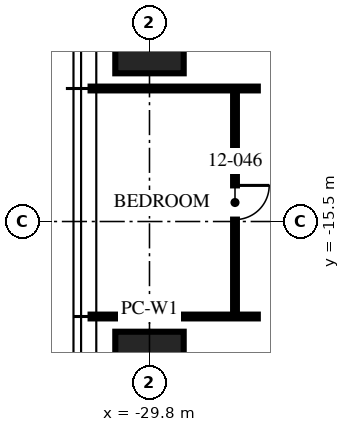
"""IFC4 building model, lengths in metres.
Left out: names, types, materials, properties, quantities, classifications, styles, units other than length and angle.
Written with IfcOpenShell. Run it as: python <this file> out.ifc"""

import sys

from ifc_helpers import new_model, si_unit, direction, frame, frame_2d, origin, origin_2d, place, context, subcontext, project, spatial, rectangle, hollow_rectangle, extrude, element, fill, save


model = new_model("IFC4")
c1 = context("Model", 3, precision=1e-05, world=origin(), true_north=direction((0.0, 1.0)))
c2 = subcontext(c1, "Body", "Model", "MODEL_VIEW")
j1 = project(units=[si_unit("LENGTHUNIT", "METRE"), si_unit("PLANEANGLEUNIT", "RADIAN")], contexts=[c1])
p1 = place(None, origin())
s1 = spatial("IfcSite", under=j1, at=p1, CompositionType="ELEMENT")
p2 = place(p1, origin())
s2 = spatial("IfcBuilding", under=s1, at=p2, CompositionType="ELEMENT")
p3 = place(p2, frame((0.0, 0.0, 51.0)))
s3 = spatial("IfcBuildingStorey", under=s2, at=p3, CompositionType="ELEMENT", Elevation=51.0)
for number, where, z_axis, x_axis in (
    (1, (-29.8, -20.0, 0.0), (0.0, 0.0, 1.0), (0.0, 1.0, 0.0)),
    (2, (-29.8, -10.0, 0.0), (0.0, 0.0, 1.0), (0.0, 1.0, 0.0)),
):
    element("IfcColumn", number, at=place(p3, frame(where, z_axis=z_axis, x_axis=x_axis)), inside=s3, PredefinedType="COLUMN", context=c2, shape_type="SweptSolid", body=[
        extrude(hollow_rectangle(XDim=3.2, YDim=1.8, WallThickness=0.2, at=origin_2d()), origin(), (0.0, 0.0, 1.0), 3.75),
    ])
for number, where, z_axis, x_axis in (
    (3, (-26.95, -12.0, 0.0), (0.0, 0.0, 1.0), (-1.0, 0.0, 0.0)),
    (4, (-26.95, -18.0, 0.0), (0.0, 0.0, 1.0), (-1.0, 0.0, 0.0)),
):
    element("IfcWall", number, at=place(p3, frame(where, z_axis=z_axis, x_axis=x_axis)), inside=s3, PredefinedType="PARTITIONING", context=c2, shape_type="SweptSolid", body=[
        extrude(rectangle(XDim=4.4, YDim=0.1, at=frame_2d((2.2, 0.0))), origin(), (0.0, 0.0, 1.0), 2.71),
    ])
p4 = place(p3, frame((-27.55, -12.0, 0.0), z_axis=(0.0, 0.0, 1.0), x_axis=(0.0, -1.0, 0.0)))
e5 = element("IfcWall", 5, at=p4, inside=s3, PredefinedType="PARTITIONING", context=c2, shape_type="SweptSolid", body=[
    extrude(rectangle(XDim=6.0, YDim=0.1, at=frame_2d((3.0, 0.0))), origin(), (0.0, 0.0, 1.0), 2.61),
])
p5 = place(p4, frame((2.55, 0.0, 0.0)))
e6 = element("IfcOpeningElement", 6, at=p5, cuts=e5, PredefinedType="OPENING", context=c2, shape_type="SweptSolid", body=[
    extrude(rectangle(XDim=0.9, YDim=2.1, at=frame_2d((0.45, 1.05))), frame((0.0, 0.06, 0.0), z_axis=(0.0, -1.0, 0.0), x_axis=(1.0, 0.0, 0.0)), (0.0, 0.0, 1.0), 0.12),
])
p6 = place(p5, origin())
e7 = element("IfcDoor", 7, at=p6, inside=s3, OperationType="SINGLE_SWING_LEFT", PredefinedType="DOOR", context=c2, shape_type="SweptSolid", body=[
    extrude(rectangle(XDim=0.9, YDim=2.1, at=frame_2d((0.45, 1.05))), frame((0.0, 0.025, 0.0), z_axis=(0.0, -1.0, 0.0), x_axis=(1.0, 0.0, 0.0)), (0.0, 0.0, 1.0), 0.05),
])
fill(e6, e7)
save(model, sys.argv[1])
